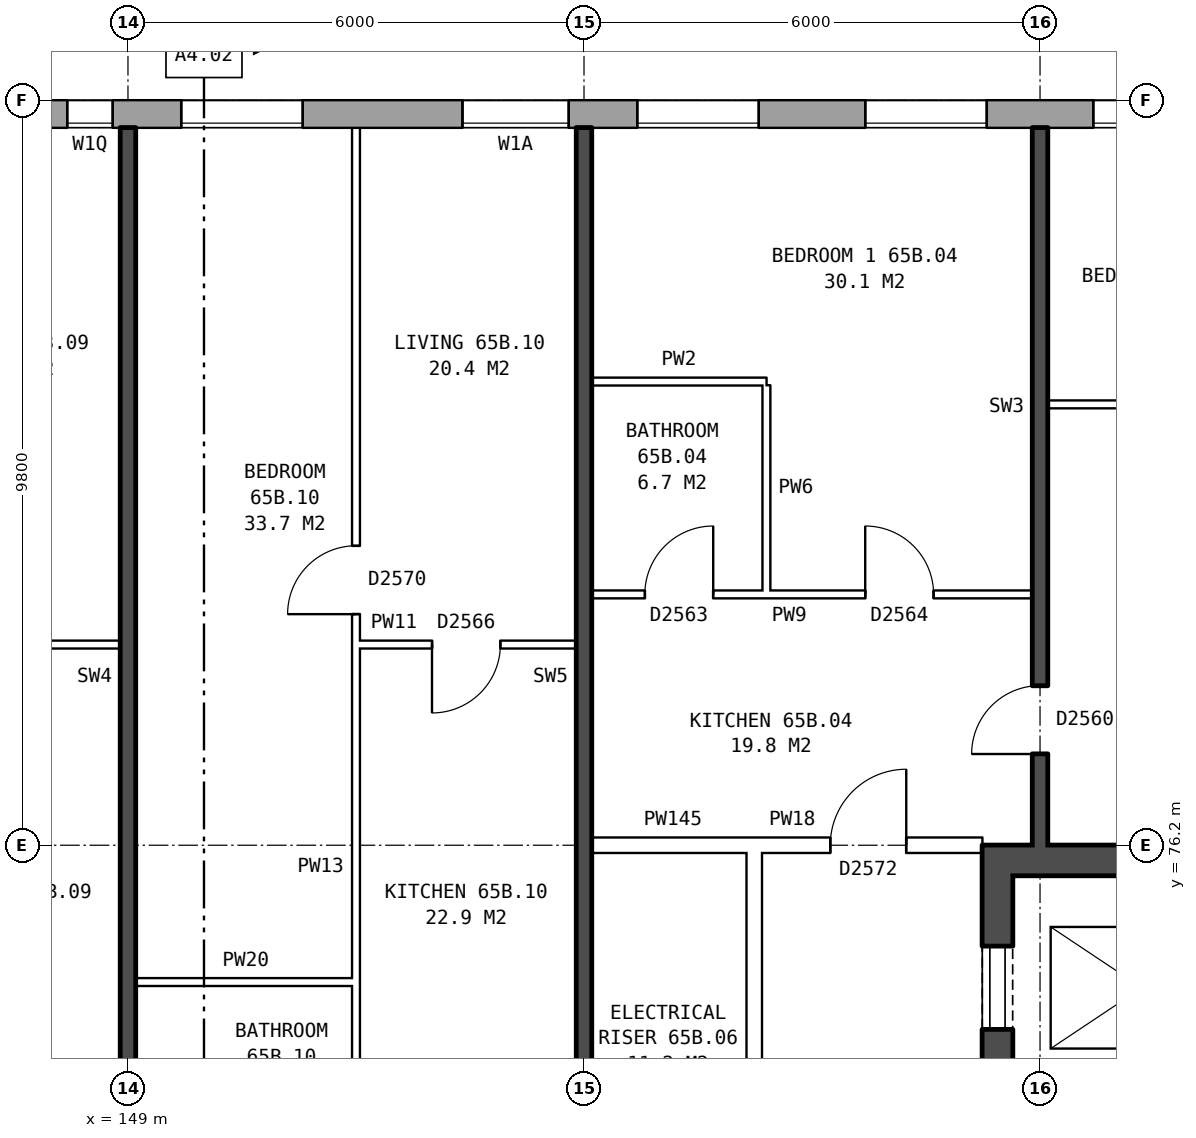
"""IFC4 building model, lengths in metres.
Left out: names, types, materials, properties, quantities, classifications, styles, units other than length and angle.
Written with IfcOpenShell. Run it as: python <this file> out.ifc"""

import sys

from ifc_helpers import new_model, si_unit, direction, frame, frame_2d, origin, place, context, subcontext, project, spatial, rectangle, extrude, element, fill, save


model = new_model("IFC4")
c1 = context("Model", 3, precision=1e-05, world=origin(), true_north=direction((0.0, 1.0)))
c2 = subcontext(c1, "Body", "Model", "MODEL_VIEW")
j1 = project(units=[si_unit("LENGTHUNIT", "METRE"), si_unit("PLANEANGLEUNIT", "RADIAN")], contexts=[c1])
p1 = place(None, origin())
s1 = spatial("IfcSite", under=j1, at=p1, CompositionType="ELEMENT")
p2 = place(p1, origin())
s2 = spatial("IfcBuilding", under=s1, at=p2, CompositionType="ELEMENT")
p3 = place(p2, frame((0.0, 0.0, 230.7)))
s3 = spatial("IfcBuildingStorey", under=s2, at=p3, CompositionType="ELEMENT", Elevation=230.7)
p4 = place(p3, frame((165.925, 85.82, 0.0), z_axis=(0.0, 0.0, 1.0), x_axis=(-1.0, 0.0, 0.0)))
e1 = element("IfcWall", 1, at=p4, inside=s3, PredefinedType="STANDARD", context=c2, shape_type="SweptSolid", body=[
    extrude(rectangle(XDim=33.875, YDim=0.36, at=frame_2d((16.938, 0.0))), origin(), (0.0, 0.0, 1.0), 2.85),
])
p5 = place(p4, frame((2.625, 0.0, 0.8)))
e2 = element("IfcOpeningElement", 2, at=p5, cuts=e1, PredefinedType="OPENING", context=c2, shape_type="SweptSolid", body=[
    extrude(rectangle(XDim=1.6, YDim=1.8, at=frame_2d((0.8, 0.9))), frame((0.0, 0.19, 0.0), z_axis=(0.0, -1.0, 0.0), x_axis=(1.0, 0.0, 0.0)), (0.0, 0.0, 1.0), 0.38),
])
p6 = place(p4, frame((5.625, 0.0, 0.8)))
e3 = element("IfcOpeningElement", 3, at=p6, cuts=e1, PredefinedType="OPENING", context=c2, shape_type="SweptSolid", body=[
    extrude(rectangle(XDim=1.6, YDim=1.8, at=frame_2d((0.8, 0.9))), frame((0.0, 0.19, 0.0), z_axis=(0.0, -1.0, 0.0), x_axis=(1.0, 0.0, 0.0)), (0.0, 0.0, 1.0), 0.38),
])
p7 = place(p4, frame((8.625, 0.0, 0.8)))
e4 = element("IfcOpeningElement", 4, at=p7, cuts=e1, PredefinedType="OPENING", context=c2, shape_type="SweptSolid", body=[
    extrude(rectangle(XDim=1.6, YDim=1.8, at=frame_2d((0.8, 0.9))), frame((0.0, 0.19, 0.0), z_axis=(0.0, -1.0, 0.0), x_axis=(1.0, 0.0, 0.0)), (0.0, 0.0, 1.0), 0.38),
])
p8 = place(p4, frame((11.125, 0.0, 0.8)))
e5 = element("IfcOpeningElement", 5, at=p8, cuts=e1, PredefinedType="OPENING", context=c2, shape_type="SweptSolid", body=[
    extrude(rectangle(XDim=1.4, YDim=1.8, at=frame_2d((0.7, 0.9))), frame((0.0, 0.19, 0.0), z_axis=(0.0, -1.0, 0.0), x_axis=(1.0, 0.0, 0.0)), (0.0, 0.0, 1.0), 0.38),
])
p9 = place(p4, frame((14.625, 0.0, 0.8)))
e6 = element("IfcOpeningElement", 6, at=p9, cuts=e1, PredefinedType="OPENING", context=c2, shape_type="SweptSolid", body=[
    extrude(rectangle(XDim=1.6, YDim=1.8, at=frame_2d((0.8, 0.9))), frame((0.0, 0.19, 0.0), z_axis=(0.0, -1.0, 0.0), x_axis=(1.0, 0.0, 0.0)), (0.0, 0.0, 1.0), 0.38),
])
p10 = place(p4, frame((17.125, 0.0, 0.25)))
e7 = element("IfcOpeningElement", 7, at=p10, cuts=e1, PredefinedType="OPENING", context=c2, shape_type="SweptSolid", body=[
    extrude(rectangle(XDim=0.6, YDim=1.2, at=frame_2d((0.3, 0.6))), frame((0.0, 0.19, 0.0), z_axis=(0.0, -1.0, 0.0), x_axis=(1.0, 0.0, 0.0)), (0.0, 0.0, 1.0), 0.38),
])
p11 = place(p4, frame((20.625, 0.0, 0.8)))
e8 = element("IfcOpeningElement", 8, at=p11, cuts=e1, PredefinedType="OPENING", context=c2, shape_type="SweptSolid", body=[
    extrude(rectangle(XDim=1.6, YDim=1.8, at=frame_2d((0.8, 0.9))), frame((0.0, 0.19, 0.0), z_axis=(0.0, -1.0, 0.0), x_axis=(1.0, 0.0, 0.0)), (0.0, 0.0, 1.0), 0.38),
])
p12 = place(p4, frame((23.625, 0.0, 0.8)))
e9 = element("IfcOpeningElement", 9, at=p12, cuts=e1, PredefinedType="OPENING", context=c2, shape_type="SweptSolid", body=[
    extrude(rectangle(XDim=1.6, YDim=1.8, at=frame_2d((0.8, 0.9))), frame((0.0, 0.19, 0.0), z_axis=(0.0, -1.0, 0.0), x_axis=(1.0, 0.0, 0.0)), (0.0, 0.0, 1.0), 0.38),
])
p13 = place(p4, frame((26.625, 0.0, 0.8)))
e10 = element("IfcOpeningElement", 10, at=p13, cuts=e1, PredefinedType="OPENING", context=c2, shape_type="SweptSolid", body=[
    extrude(rectangle(XDim=1.6, YDim=1.8, at=frame_2d((0.8, 0.9))), frame((0.0, 0.19, 0.0), z_axis=(0.0, -1.0, 0.0), x_axis=(1.0, 0.0, 0.0)), (0.0, 0.0, 1.0), 0.38),
])
p14 = place(p4, frame((29.625, 0.0, 0.8)))
e11 = element("IfcOpeningElement", 11, at=p14, cuts=e1, PredefinedType="OPENING", context=c2, shape_type="SweptSolid", body=[
    extrude(rectangle(XDim=1.6, YDim=1.8, at=frame_2d((0.8, 0.9))), frame((0.0, 0.19, 0.0), z_axis=(0.0, -1.0, 0.0), x_axis=(1.0, 0.0, 0.0)), (0.0, 0.0, 1.0), 0.38),
])
p15 = place(p4, frame((18.925, 0.0, 1.35)))
e12 = element("IfcOpeningElement", 12, at=p15, cuts=e1, PredefinedType="OPENING", context=c2, shape_type="SweptSolid", body=[
    extrude(rectangle(XDim=0.8, YDim=1.2, at=frame_2d((0.4, 0.6))), frame((0.0, 0.19, 0.0), z_axis=(0.0, -1.0, 0.0), x_axis=(1.0, 0.0, 0.0)), (0.0, 0.0, 1.0), 0.38),
])
p16 = place(p3, frame((160.44, 76.2, 0.0), z_axis=(0.0, 0.0, 1.0), x_axis=(0.0, -1.0, 0.0)))
e13 = element("IfcWall", 13, at=p16, inside=s3, PredefinedType="SHEAR", context=c2, shape_type="SweptSolid", body=[
    extrude(rectangle(XDim=12.4, YDim=0.4, at=frame_2d((6.2, 0.0))), origin(), (0.0, 0.0, 1.0), 2.85),
])
p17 = place(p16, frame((1.325, 0.0, 0.0)))
e14 = element("IfcOpeningElement", 14, at=p17, cuts=e13, PredefinedType="OPENING", context=c2, shape_type="SweptSolid", body=[
    extrude(rectangle(XDim=1.1, YDim=2.1, at=frame_2d((0.55, 1.05))), frame((0.0, 0.21, 0.0), z_axis=(0.0, -1.0, 0.0), x_axis=(1.0, 0.0, 0.0)), (0.0, 0.0, 1.0), 0.42),
])
p18 = place(p16, frame((4.825, 0.0, 0.0)))
e15 = element("IfcOpeningElement", 15, at=p18, cuts=e13, PredefinedType="OPENING", context=c2, shape_type="SweptSolid", body=[
    extrude(rectangle(XDim=0.85, YDim=2.1, at=frame_2d((0.425, 1.05))), frame((0.0, 0.21, 0.0), z_axis=(0.0, -1.0, 0.0), x_axis=(1.0, 0.0, 0.0)), (0.0, 0.0, 1.0), 0.42),
])
p19 = place(p16, frame((9.9, 0.0, 0.0)))
e16 = element("IfcOpeningElement", 16, at=p19, cuts=e13, PredefinedType="OPENING", context=c2, shape_type="SweptSolid", body=[
    extrude(rectangle(XDim=1.1, YDim=2.1, at=frame_2d((0.55, 1.05))), frame((0.0, 0.21, 0.0), z_axis=(0.0, -1.0, 0.0), x_axis=(1.0, 0.0, 0.0)), (0.0, 0.0, 1.0), 0.42),
])
p20 = place(p16, frame((8.125, 0.0, 0.0)))
e17 = element("IfcOpeningElement", 17, at=p20, cuts=e13, PredefinedType="OPENING", context=c2, shape_type="SweptSolid", body=[
    extrude(rectangle(XDim=0.85, YDim=2.1, at=frame_2d((0.425, 1.05))), frame((0.0, 0.21, 0.0), z_axis=(0.0, -1.0, 0.0), x_axis=(1.0, 0.0, 0.0)), (0.0, 0.0, 1.0), 0.42),
])
p21 = place(p3, frame((160.64, 76.0, 0.0), z_axis=(0.0, 0.0, 1.0), x_axis=(1.0, 0.0, 0.0)))
e18 = element("IfcWall", 18, at=p21, inside=s3, PredefinedType="SHEAR", context=c2, shape_type="SweptSolid", body=[
    extrude(rectangle(XDim=7.6, YDim=0.4, at=frame_2d((3.8, 0.0))), origin(), (0.0, 0.0, 1.0), 2.85),
])
p22 = place(p3, frame((157.24, 63.9, 0.0), z_axis=(0.0, 0.0, 1.0), x_axis=(0.0, 1.0, 0.0)))
e19 = element("IfcWall", 19, at=p22, inside=s3, PredefinedType="PARTITIONING", context=c2, shape_type="SweptSolid", body=[
    extrude(rectangle(XDim=12.2, YDim=0.2, at=frame_2d((6.1, 0.0))), origin(), (0.0, 0.0, 1.0), 2.85),
])
p23 = place(p22, frame((5.1, 0.0, 0.0)))
e20 = element("IfcOpeningElement", 20, at=p23, cuts=e19, PredefinedType="OPENING", context=c2, shape_type="SweptSolid", body=[
    extrude(rectangle(XDim=2.0, YDim=2.1, at=frame_2d((1.0, 1.05))), frame((0.0, 0.11, 0.0), z_axis=(0.0, -1.0, 0.0), x_axis=(1.0, 0.0, 0.0)), (0.0, 0.0, 1.0), 0.22),
])
p24 = place(p3, frame((149.1, 74.4, 0.0), z_axis=(0.0, 0.0, 1.0), x_axis=(1.0, 0.0, 0.0)))
e21 = element("IfcWall", 21, at=p24, inside=s3, PredefinedType="PARTITIONING", context=c2, shape_type="SweptSolid", body=[
    extrude(rectangle(XDim=2.9, YDim=0.1, at=frame_2d((1.45, 0.0))), origin(), (0.0, 0.0, 1.0), 2.85),
])
p25 = place(p3, frame((155.1, 76.2, 0.0), z_axis=(0.0, 0.0, 1.0), x_axis=(1.0, 0.0, 0.0)))
e22 = element("IfcWall", 22, at=p25, inside=s3, PredefinedType="PARTITIONING", context=c2, shape_type="SweptSolid", body=[
    extrude(rectangle(XDim=2.14, YDim=0.2, at=frame_2d((1.07, 0.0))), origin(), (0.0, 0.0, 1.0), 2.85),
])
p26 = place(p3, frame((157.24, 76.2, 0.0), z_axis=(0.0, 0.0, 1.0), x_axis=(1.0, 0.0, 0.0)))
e23 = element("IfcWall", 23, at=p26, inside=s3, PredefinedType="PARTITIONING", context=c2, shape_type="SweptSolid", body=[
    extrude(rectangle(XDim=3.0, YDim=0.2, at=frame_2d((1.5, 0.0))), origin(), (0.0, 0.0, 1.0), 2.85),
])
p27 = place(p26, frame((1.0, 0.0, 0.0)))
e24 = element("IfcOpeningElement", 24, at=p27, cuts=e23, PredefinedType="OPENING", context=c2, shape_type="SweptSolid", body=[
    extrude(rectangle(XDim=1.0, YDim=2.1, at=frame_2d((0.5, 1.05))), frame((0.0, 0.11, 0.0), z_axis=(0.0, -1.0, 0.0), x_axis=(1.0, 0.0, 0.0)), (0.0, 0.0, 1.0), 0.22),
])
p28 = place(p3, frame((146.0, 78.84, 0.0), z_axis=(0.0, 0.0, 1.0), x_axis=(1.0, 0.0, 0.0)))
e25 = element("IfcWall", 25, at=p28, inside=s3, PredefinedType="PARTITIONING", context=c2, shape_type="SweptSolid", body=[
    extrude(rectangle(XDim=2.9, YDim=0.1, at=frame_2d((1.45, 0.0))), origin(), (0.0, 0.0, 1.0), 2.85),
])
p29 = place(p28, frame((1.0, 0.0, 0.0)))
e26 = element("IfcOpeningElement", 26, at=p29, cuts=e25, PredefinedType="OPENING", context=c2, shape_type="SweptSolid", body=[
    extrude(rectangle(XDim=0.9, YDim=2.1, at=frame_2d((0.45, 1.05))), frame((0.0, 0.06, 0.0), z_axis=(0.0, -1.0, 0.0), x_axis=(1.0, 0.0, 0.0)), (0.0, 0.0, 1.0), 0.12),
])
p30 = place(p3, frame((152.0, 78.84, 0.0), z_axis=(0.0, 0.0, 1.0), x_axis=(1.0, 0.0, 0.0)))
e27 = element("IfcWall", 27, at=p30, inside=s3, PredefinedType="PARTITIONING", context=c2, shape_type="SweptSolid", body=[
    extrude(rectangle(XDim=2.9, YDim=0.1, at=frame_2d((1.45, 0.0))), origin(), (0.0, 0.0, 1.0), 2.85),
])
p31 = place(p30, frame((1.0, 0.0, 0.0)))
e28 = element("IfcOpeningElement", 28, at=p31, cuts=e27, PredefinedType="OPENING", context=c2, shape_type="SweptSolid", body=[
    extrude(rectangle(XDim=0.9, YDim=2.1, at=frame_2d((0.45, 1.05))), frame((0.0, 0.06, 0.0), z_axis=(0.0, -1.0, 0.0), x_axis=(1.0, 0.0, 0.0)), (0.0, 0.0, 1.0), 0.12),
])
p32 = place(p3, frame((155.1, 79.5, 0.0), z_axis=(0.0, 0.0, 1.0), x_axis=(1.0, 0.0, 0.0)))
e29 = element("IfcWall", 29, at=p32, inside=s3, PredefinedType="PARTITIONING", context=c2, shape_type="SweptSolid", body=[
    extrude(rectangle(XDim=5.8, YDim=0.1, at=frame_2d((2.9, 0.0))), origin(), (0.0, 0.0, 1.0), 2.85),
])
p33 = place(p32, frame((3.6, 0.0, 0.0)))
e30 = element("IfcOpeningElement", 30, at=p33, cuts=e29, PredefinedType="OPENING", context=c2, shape_type="SweptSolid", body=[
    extrude(rectangle(XDim=0.9, YDim=2.1, at=frame_2d((0.45, 1.05))), frame((0.0, 0.06, 0.0), z_axis=(0.0, -1.0, 0.0), x_axis=(1.0, 0.0, 0.0)), (0.0, 0.0, 1.0), 0.12),
])
p34 = place(p32, frame((0.7, 0.0, 0.0)))
e31 = element("IfcOpeningElement", 31, at=p34, cuts=e29, PredefinedType="OPENING", context=c2, shape_type="SweptSolid", body=[
    extrude(rectangle(XDim=0.9, YDim=2.1, at=frame_2d((0.45, 1.05))), frame((0.0, 0.06, 0.0), z_axis=(0.0, -1.0, 0.0), x_axis=(1.0, 0.0, 0.0)), (0.0, 0.0, 1.0), 0.12),
])
p35 = place(p3, frame((161.1, 82.0, 0.0), z_axis=(0.0, 0.0, 1.0), x_axis=(1.0, 0.0, 0.0)))
e32 = element("IfcWall", 32, at=p35, inside=s3, PredefinedType="PARTITIONING", context=c2, shape_type="SweptSolid", body=[
    extrude(rectangle(XDim=7.54, YDim=0.1, at=frame_2d((3.77, 0.0))), origin(), (0.0, 0.0, 1.0), 2.85),
])
p36 = place(p35, frame((3.32, 0.0, 0.0)))
e33 = element("IfcOpeningElement", 33, at=p36, cuts=e32, PredefinedType="OPENING", context=c2, shape_type="SweptSolid", body=[
    extrude(rectangle(XDim=0.9, YDim=2.1, at=frame_2d((0.45, 1.05))), frame((0.0, 0.06, 0.0), z_axis=(0.0, -1.0, 0.0), x_axis=(1.0, 0.0, 0.0)), (0.0, 0.0, 1.0), 0.12),
])
p37 = place(p3, frame((155.1, 82.3, 0.0), z_axis=(0.0, 0.0, 1.0), x_axis=(1.0, 0.0, 0.0)))
e34 = element("IfcWall", 34, at=p37, inside=s3, PredefinedType="PARTITIONING", context=c2, shape_type="SweptSolid", body=[
    extrude(rectangle(XDim=2.3, YDim=0.1, at=frame_2d((1.15, 0.0))), origin(), (0.0, 0.0, 1.0), 2.85),
])
p38 = place(p3, frame((149.0, 71.2, 0.0), z_axis=(0.0, 0.0, 1.0), x_axis=(0.0, 1.0, 0.0)))
e35 = element("IfcWall", 35, at=p38, inside=s3, PredefinedType="SOLIDWALL", context=c2, shape_type="SweptSolid", body=[
    extrude(rectangle(XDim=14.44, YDim=0.2, at=frame_2d((7.22, 0.0))), origin(), (0.0, 0.0, 1.0), 2.85),
])
p39 = place(p3, frame((152.0, 71.3, 0.0), z_axis=(0.0, 0.0, 1.0), x_axis=(0.0, 1.0, 0.0)))
e36 = element("IfcWall", 36, at=p39, inside=s3, PredefinedType="PARTITIONING", context=c2, shape_type="SweptSolid", body=[
    extrude(rectangle(XDim=14.34, YDim=0.1, at=frame_2d((7.17, 0.0))), origin(), (0.0, 0.0, 1.0), 2.85),
])
p40 = place(p39, frame((7.94, 0.0, 0.0)))
e37 = element("IfcOpeningElement", 37, at=p40, cuts=e36, PredefinedType="OPENING", context=c2, shape_type="SweptSolid", body=[
    extrude(rectangle(XDim=0.9, YDim=2.1, at=frame_2d((0.45, 1.05))), frame((0.0, 0.06, 0.0), z_axis=(0.0, -1.0, 0.0), x_axis=(1.0, 0.0, 0.0)), (0.0, 0.0, 1.0), 0.12),
])
p41 = place(p39, frame((0.4, 0.0, 0.0)))
e38 = element("IfcOpeningElement", 38, at=p41, cuts=e36, PredefinedType="OPENING", context=c2, shape_type="SweptSolid", body=[
    extrude(rectangle(XDim=0.9, YDim=2.1, at=frame_2d((0.45, 1.05))), frame((0.0, 0.06, 0.0), z_axis=(0.0, -1.0, 0.0), x_axis=(1.0, 0.0, 0.0)), (0.0, 0.0, 1.0), 0.12),
])
p42 = place(p3, frame((155.0, 71.2, 0.0), z_axis=(0.0, 0.0, 1.0), x_axis=(0.0, 1.0, 0.0)))
e39 = element("IfcWall", 39, at=p42, inside=s3, PredefinedType="SOLIDWALL", context=c2, shape_type="SweptSolid", body=[
    extrude(rectangle(XDim=14.44, YDim=0.2, at=frame_2d((7.22, 0.0))), origin(), (0.0, 0.0, 1.0), 2.85),
])
p43 = place(p3, frame((157.4, 79.55, 0.0), z_axis=(0.0, 0.0, 1.0), x_axis=(0.0, 1.0, 0.0)))
e40 = element("IfcWall", 40, at=p43, inside=s3, PredefinedType="PARTITIONING", context=c2, shape_type="SweptSolid", body=[
    extrude(rectangle(XDim=2.7, YDim=0.1, at=frame_2d((1.35, 0.0))), origin(), (0.0, 0.0, 1.0), 2.85),
])
p44 = place(p3, frame((161.0, 76.2, 0.0), z_axis=(0.0, 0.0, 1.0), x_axis=(0.0, 1.0, 0.0)))
e41 = element("IfcWall", 41, at=p44, inside=s3, PredefinedType="SOLIDWALL", context=c2, shape_type="SweptSolid", body=[
    extrude(rectangle(XDim=9.44, YDim=0.2, at=frame_2d((4.72, 0.0))), origin(), (0.0, 0.0, 1.0), 2.85),
])
p45 = place(p44, frame((1.2, 0.0, 0.0)))
e42 = element("IfcOpeningElement", 42, at=p45, cuts=e41, PredefinedType="OPENING", context=c2, shape_type="SweptSolid", body=[
    extrude(rectangle(XDim=0.9, YDim=2.1, at=frame_2d((0.45, 1.05))), frame((0.0, 0.11, 0.0), z_axis=(0.0, -1.0, 0.0), x_axis=(1.0, 0.0, 0.0)), (0.0, 0.0, 1.0), 0.22),
])
p46 = place(p5, origin())
e43 = element("IfcWindow", 43, at=p46, inside=s3, PartitioningType="SINGLE_PANEL", PredefinedType="WINDOW", context=c2, shape_type="SweptSolid", body=[
    extrude(rectangle(XDim=1.6, YDim=1.8, at=frame_2d((0.8, 0.9))), frame((0.0, 0.15, 0.0), z_axis=(0.0, -1.0, 0.0), x_axis=(1.0, 0.0, 0.0)), (0.0, 0.0, 1.0), 0.06),
])
fill(e2, e43)
p47 = place(p6, origin())
e44 = element("IfcWindow", 44, at=p47, inside=s3, PartitioningType="SINGLE_PANEL", PredefinedType="WINDOW", context=c2, shape_type="SweptSolid", body=[
    extrude(rectangle(XDim=1.6, YDim=1.8, at=frame_2d((0.8, 0.9))), frame((0.0, 0.15, 0.0), z_axis=(0.0, -1.0, 0.0), x_axis=(1.0, 0.0, 0.0)), (0.0, 0.0, 1.0), 0.06),
])
fill(e3, e44)
p48 = place(p7, origin())
e45 = element("IfcWindow", 45, at=p48, inside=s3, PartitioningType="SINGLE_PANEL", PredefinedType="WINDOW", context=c2, shape_type="SweptSolid", body=[
    extrude(rectangle(XDim=1.6, YDim=1.8, at=frame_2d((0.8, 0.9))), frame((0.0, 0.15, 0.0), z_axis=(0.0, -1.0, 0.0), x_axis=(1.0, 0.0, 0.0)), (0.0, 0.0, 1.0), 0.06),
])
fill(e4, e45)
p49 = place(p8, origin())
e46 = element("IfcWindow", 46, at=p49, inside=s3, PartitioningType="SINGLE_PANEL", PredefinedType="WINDOW", context=c2, shape_type="SweptSolid", body=[
    extrude(rectangle(XDim=1.4, YDim=1.8, at=frame_2d((0.7, 0.9))), frame((0.0, 0.15, 0.0), z_axis=(0.0, -1.0, 0.0), x_axis=(1.0, 0.0, 0.0)), (0.0, 0.0, 1.0), 0.06),
])
fill(e5, e46)
p50 = place(p9, origin())
e47 = element("IfcWindow", 47, at=p50, inside=s3, PartitioningType="SINGLE_PANEL", PredefinedType="WINDOW", context=c2, shape_type="SweptSolid", body=[
    extrude(rectangle(XDim=1.6, YDim=1.8, at=frame_2d((0.8, 0.9))), frame((0.0, 0.15, 0.0), z_axis=(0.0, -1.0, 0.0), x_axis=(1.0, 0.0, 0.0)), (0.0, 0.0, 1.0), 0.06),
])
fill(e6, e47)
p51 = place(p10, origin())
e48 = element("IfcWindow", 48, at=p51, inside=s3, PartitioningType="SINGLE_PANEL", PredefinedType="WINDOW", context=c2, shape_type="SweptSolid", body=[
    extrude(rectangle(XDim=0.6, YDim=1.2, at=frame_2d((0.3, 0.6))), frame((0.0, 0.15, 0.0), z_axis=(0.0, -1.0, 0.0), x_axis=(1.0, 0.0, 0.0)), (0.0, 0.0, 1.0), 0.06),
])
fill(e7, e48)
p52 = place(p17, origin())
e49 = element("IfcDoor", 49, at=p52, inside=s3, OperationType="DOUBLE_DOOR_SLIDING", PredefinedType="DOOR", context=c2, shape_type="SweptSolid", body=[
    extrude(rectangle(XDim=1.1, YDim=2.1, at=frame_2d((0.55, 1.05))), frame((0.0, 0.185, 0.0), z_axis=(0.0, -1.0, 0.0), x_axis=(1.0, 0.0, 0.0)), (0.0, 0.0, 1.0), 0.05),
])
fill(e14, e49)
p53 = place(p33, origin())
e50 = element("IfcDoor", 50, at=p53, inside=s3, OperationType="SINGLE_SWING_LEFT", PredefinedType="DOOR", context=c2, shape_type="SweptSolid", body=[
    extrude(rectangle(XDim=0.9, YDim=2.1, at=frame_2d((0.45, 1.05))), frame((0.0, 0.025, 0.0), z_axis=(0.0, -1.0, 0.0), x_axis=(1.0, 0.0, 0.0)), (0.0, 0.0, 1.0), 0.05),
])
fill(e30, e50)
p54 = place(p27, origin())
e51 = element("IfcDoor", 51, at=p54, inside=s3, OperationType="SINGLE_SWING_RIGHT", PredefinedType="DOOR", context=c2, shape_type="SweptSolid", body=[
    extrude(rectangle(XDim=1.0, YDim=2.1, at=frame_2d((0.5, 1.05))), frame((0.0, 0.025, 0.0), z_axis=(0.0, -1.0, 0.0), x_axis=(1.0, 0.0, 0.0)), (0.0, 0.0, 1.0), 0.05),
])
fill(e24, e51)
p55 = place(p45, origin())
e52 = element("IfcDoor", 52, at=p55, inside=s3, OperationType="SINGLE_SWING_LEFT", PredefinedType="DOOR", context=c2, shape_type="SweptSolid", body=[
    extrude(rectangle(XDim=0.9, YDim=2.1, at=frame_2d((0.45, 1.05))), frame((0.0, 0.025, 0.0), z_axis=(0.0, -1.0, 0.0), x_axis=(1.0, 0.0, 0.0)), (0.0, 0.0, 1.0), 0.05),
])
fill(e42, e52)
p56 = place(p34, origin())
e53 = element("IfcDoor", 53, at=p56, inside=s3, OperationType="SINGLE_SWING_RIGHT", PredefinedType="DOOR", context=c2, shape_type="SweptSolid", body=[
    extrude(rectangle(XDim=0.9, YDim=2.1, at=frame_2d((0.45, 1.05))), frame((0.0, 0.025, 0.0), z_axis=(0.0, -1.0, 0.0), x_axis=(1.0, 0.0, 0.0)), (0.0, 0.0, 1.0), 0.05),
])
fill(e31, e53)
p57 = place(p40, origin())
e54 = element("IfcDoor", 54, at=p57, inside=s3, OperationType="SINGLE_SWING_LEFT", PredefinedType="DOOR", context=c2, shape_type="SweptSolid", body=[
    extrude(rectangle(XDim=0.9, YDim=2.1, at=frame_2d((0.45, 1.05))), frame((0.0, 0.025, 0.0), z_axis=(0.0, -1.0, 0.0), x_axis=(1.0, 0.0, 0.0)), (0.0, 0.0, 1.0), 0.05),
])
fill(e37, e54)
p58 = place(p31, frame((0.9, 0.0, 0.0), z_axis=(0.0, 0.0, 1.0), x_axis=(-1.0, 0.0, 0.0)))
e55 = element("IfcDoor", 55, at=p58, inside=s3, OperationType="SINGLE_SWING_RIGHT", PredefinedType="DOOR", context=c2, shape_type="SweptSolid", body=[
    extrude(rectangle(XDim=0.9, YDim=2.1, at=frame_2d((0.45, 1.05))), frame((0.0, 0.025, 0.0), z_axis=(0.0, -1.0, 0.0), x_axis=(1.0, 0.0, 0.0)), (0.0, 0.0, 1.0), 0.05),
])
fill(e28, e55)
save(model, sys.argv[1])
